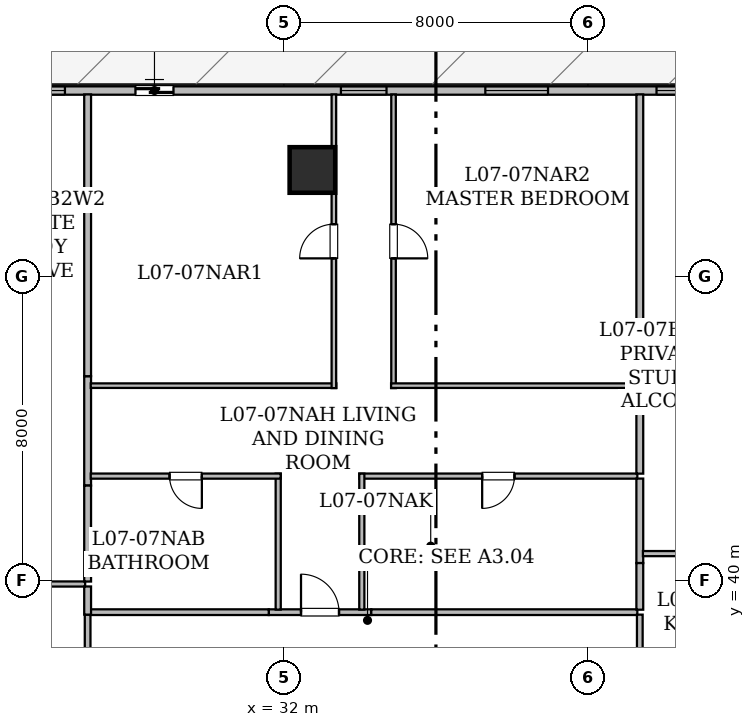
"""IFC4 building model, lengths in metres.
Left out: names, types, materials, properties, quantities, classifications, styles, units other than length and angle.
Written with IfcOpenShell. Run it as: python <this file> out.ifc"""

import sys

from ifc_helpers import new_model, si_unit, direction, frame, frame_2d, origin, origin_2d, place, context, subcontext, project, spatial, rectangle, hollow_rectangle, extrude, element, fill, save


model = new_model("IFC4")
c1 = context("Model", 3, precision=1e-05, world=origin(), true_north=direction((0.0, 1.0)))
c2 = subcontext(c1, "Body", "Model", "MODEL_VIEW")
j1 = project(units=[si_unit("LENGTHUNIT", "METRE"), si_unit("PLANEANGLEUNIT", "RADIAN")], contexts=[c1])
p1 = place(None, origin())
s1 = spatial("IfcSite", under=j1, at=p1, CompositionType="ELEMENT")
p2 = place(p1, origin())
s2 = spatial("IfcBuilding", under=s1, at=p2, CompositionType="ELEMENT")
p3 = place(p2, frame((0.0, 0.0, 33.3)))
s3 = spatial("IfcBuildingStorey", under=s2, at=p3, CompositionType="ELEMENT", Elevation=33.3)
p4 = place(p3, frame((32.75, 50.8, 0.025), z_axis=(0.0, 0.0, 1.0), x_axis=(1.0, 0.0, 0.0)))
e1 = element("IfcColumn", 1, at=p4, inside=s3, PredefinedType="COLUMN", context=c2, shape_type="SweptSolid", body=[
    extrude(hollow_rectangle(XDim=1.2, YDim=1.2, WallThickness=0.06, at=origin_2d()), origin(), (0.0, 0.0, 1.0), 3.625),
])
p5 = place(p3, frame((8.315, 52.89, 0.0), z_axis=(0.0, 0.0, 1.0), x_axis=(1.0, 0.0, 0.0)))
e2 = element("IfcWall", 2, at=p5, inside=s3, PredefinedType="STANDARD", context=c2, shape_type="SweptSolid", body=[
    extrude(rectangle(XDim=37.439, YDim=0.22, at=frame_2d((18.719, 0.0))), origin(), (0.0, 0.0, 1.0), 3.43),
])
p6 = place(p5, frame((19.779, 0.0, 0.0)))
e3 = element("IfcOpeningElement", 3, at=p6, cuts=e2, PredefinedType="OPENING", context=c2, shape_type="SweptSolid", body=[
    extrude(rectangle(XDim=1.0, YDim=2.15, at=frame_2d((0.5, 1.075))), frame((0.0, 0.12, 0.0), z_axis=(0.0, -1.0, 0.0), x_axis=(1.0, 0.0, 0.0)), (0.0, 0.0, 1.0), 0.24),
])
p7 = place(p5, frame((4.524, 0.0, 0.85)))
e4 = element("IfcOpeningElement", 4, at=p7, cuts=e2, PredefinedType="OPENING", context=c2, shape_type="SweptSolid", body=[
    extrude(rectangle(XDim=1.65, YDim=1.55, at=frame_2d((0.825, 0.775))), frame((0.0, 0.12, 0.0), z_axis=(0.0, -1.0, 0.0), x_axis=(1.0, 0.0, 0.0)), (0.0, 0.0, 1.0), 0.24),
])
p8 = place(p5, frame((16.273, 0.0, 0.85)))
e5 = element("IfcOpeningElement", 5, at=p8, cuts=e2, PredefinedType="OPENING", context=c2, shape_type="SweptSolid", body=[
    extrude(rectangle(XDim=1.65, YDim=1.55, at=frame_2d((0.825, 0.775))), frame((0.0, 0.12, 0.0), z_axis=(0.0, -1.0, 0.0), x_axis=(1.0, 0.0, 0.0)), (0.0, 0.0, 1.0), 0.24),
])
p9 = place(p5, frame((14.285, 0.0, 0.8)))
e6 = element("IfcOpeningElement", 6, at=p9, cuts=e2, PredefinedType="OPENING", context=c2, shape_type="SweptSolid", body=[
    extrude(rectangle(XDim=1.2, YDim=1.5, at=frame_2d((0.6, 0.75))), frame((0.0, 0.12, 0.0), z_axis=(0.0, -1.0, 0.0), x_axis=(1.0, 0.0, 0.0)), (0.0, 0.0, 1.0), 0.24),
])
p10 = place(p5, frame((10.238, 0.0, 0.85)))
e7 = element("IfcOpeningElement", 7, at=p10, cuts=e2, PredefinedType="OPENING", context=c2, shape_type="SweptSolid", body=[
    extrude(rectangle(XDim=1.65, YDim=1.55, at=frame_2d((0.825, 0.775))), frame((0.0, 0.12, 0.0), z_axis=(0.0, -1.0, 0.0), x_axis=(1.0, 0.0, 0.0)), (0.0, 0.0, 1.0), 0.24),
])
p11 = place(p5, frame((25.185, 0.0, 0.8)))
e8 = element("IfcOpeningElement", 8, at=p11, cuts=e2, PredefinedType="OPENING", context=c2, shape_type="SweptSolid", body=[
    extrude(rectangle(XDim=1.2, YDim=1.5, at=frame_2d((0.6, 0.75))), frame((0.0, 0.12, 0.0), z_axis=(0.0, -1.0, 0.0), x_axis=(1.0, 0.0, 0.0)), (0.0, 0.0, 1.0), 0.24),
])
p12 = place(p5, frame((28.985, 0.0, 0.85)))
e9 = element("IfcOpeningElement", 9, at=p12, cuts=e2, PredefinedType="OPENING", context=c2, shape_type="SweptSolid", body=[
    extrude(rectangle(XDim=1.65, YDim=1.55, at=frame_2d((0.825, 0.775))), frame((0.0, 0.12, 0.0), z_axis=(0.0, -1.0, 0.0), x_axis=(1.0, 0.0, 0.0)), (0.0, 0.0, 1.0), 0.24),
])
p13 = place(p5, frame((33.49, 0.0, 0.85)))
e10 = element("IfcOpeningElement", 10, at=p13, cuts=e2, PredefinedType="OPENING", context=c2, shape_type="SweptSolid", body=[
    extrude(rectangle(XDim=1.65, YDim=1.55, at=frame_2d((0.825, 0.775))), frame((0.0, 0.12, 0.0), z_axis=(0.0, -1.0, 0.0), x_axis=(1.0, 0.0, 0.0)), (0.0, 0.0, 1.0), 0.24),
])
p14 = place(p5, frame((35.942, 0.0, 0.85)))
e11 = element("IfcOpeningElement", 11, at=p14, cuts=e2, PredefinedType="OPENING", context=c2, shape_type="SweptSolid", body=[
    extrude(rectangle(XDim=1.35, YDim=1.5, at=frame_2d((0.675, 0.75))), frame((0.0, 0.12, 0.0), z_axis=(0.0, -1.0, 0.0), x_axis=(1.0, 0.0, 0.0)), (0.0, 0.0, 1.0), 0.24),
])
p15 = place(p3, frame((26.835, 35.19, 0.0), z_axis=(0.0, 0.0, 1.0), x_axis=(0.0, 1.0, 0.0)))
e12 = element("IfcWall", 12, at=p15, inside=s3, PredefinedType="STANDARD", context=c2, shape_type="SweptSolid", body=[
    extrude(rectangle(XDim=3.91, YDim=0.15, at=frame_2d((1.955, 0.0))), origin(), (0.0, 0.0, 1.0), 2.647),
])
p16 = place(p3, frame((31.601, 39.165, 0.0), z_axis=(0.0, 0.0, 1.0), x_axis=(1.0, 0.0, 0.0)))
e13 = element("IfcWall", 13, at=p16, inside=s3, PredefinedType="STANDARD", context=c2, shape_type="SweptSolid", body=[
    extrude(rectangle(XDim=2.698, YDim=0.15, at=frame_2d((1.349, 0.0))), origin(), (0.0, 0.0, 1.0), 3.43),
])
p17 = place(p16, frame((0.849, 0.0, 0.0)))
e14 = element("IfcOpeningElement", 14, at=p17, cuts=e13, PredefinedType="OPENING", context=c2, shape_type="SweptSolid", body=[
    extrude(rectangle(XDim=1.0, YDim=2.15, at=frame_2d((0.5, 1.075))), frame((0.0, 0.085, 0.0), z_axis=(0.0, -1.0, 0.0), x_axis=(1.0, 0.0, 0.0)), (0.0, 0.0, 1.0), 0.17),
])
p18 = place(p3, frame((26.9, 39.165, 0.0), z_axis=(0.0, 0.0, 1.0), x_axis=(1.0, 0.0, 0.0)))
e15 = element("IfcWall", 15, at=p18, inside=s3, PredefinedType="STANDARD", context=c2, shape_type="SweptSolid", body=[
    extrude(rectangle(XDim=4.701, YDim=0.15, at=frame_2d((2.351, 0.0))), origin(), (0.0, 0.0, 1.0), 2.647),
])
p19 = place(p3, frame((34.299, 39.165, 0.0), z_axis=(0.0, 0.0, 1.0), x_axis=(1.0, 0.0, 0.0)))
e16 = element("IfcWall", 16, at=p19, inside=s3, PredefinedType="STANDARD", context=c2, shape_type="SweptSolid", body=[
    extrude(rectangle(XDim=7.001, YDim=0.15, at=frame_2d((3.5, 0.0))), origin(), (0.0, 0.0, 1.0), 3.43),
])
p20 = place(p3, frame((41.365, 39.1, 0.0), z_axis=(0.0, 0.0, 1.0), x_axis=(0.0, -1.0, 0.0)))
e17 = element("IfcWall", 17, at=p20, inside=s3, PredefinedType="STANDARD", context=c2, shape_type="SweptSolid", body=[
    extrude(rectangle(XDim=3.11, YDim=0.15, at=frame_2d((1.555, 0.0))), origin(), (0.0, 0.0, 1.0), 2.647),
])
p21 = place(p3, frame((26.77, 39.906, 0.0), z_axis=(0.0, 0.0, 1.0), x_axis=(-1.0, 0.0, 0.0)))
e18 = element("IfcWall", 18, at=p21, inside=s3, PredefinedType="PARTITIONING", context=c2, shape_type="SweptSolid", body=[
    extrude(rectangle(XDim=2.715, YDim=0.135, at=frame_2d((1.357, 0.0))), origin(), (0.0, 0.0, 1.0), 3.43),
])
p22 = place(p3, frame((26.835, 45.374, 0.0), z_axis=(0.0, 0.0, 1.0), x_axis=(0.0, -1.0, 0.0)))
e19 = element("IfcWall", 19, at=p22, inside=s3, PredefinedType="STANDARD", context=c2, shape_type="SweptSolid", body=[
    extrude(rectangle(XDim=2.878, YDim=0.18, at=frame_2d((1.439, 0.0))), origin(), (0.0, 0.0, 1.0), 2.957),
])
p23 = place(p3, frame((26.835, 42.496, 0.0), z_axis=(0.0, 0.0, 1.0), x_axis=(0.0, -1.0, 0.0)))
e20 = element("IfcWall", 20, at=p23, inside=s3, PredefinedType="STANDARD", context=c2, shape_type="SweptSolid", body=[
    extrude(rectangle(XDim=2.525, YDim=0.18, at=frame_2d((1.263, 0.0))), origin(), (0.0, 0.0, 1.0), 2.957),
])
p24 = place(p3, frame((26.835, 52.788, 0.0), z_axis=(0.0, 0.0, 1.0), x_axis=(0.0, -1.0, 0.0)))
e21 = element("IfcWall", 21, at=p24, inside=s3, PredefinedType="STANDARD", context=c2, shape_type="SweptSolid", body=[
    extrude(rectangle(XDim=7.414, YDim=0.18, at=frame_2d((3.707, 0.0))), origin(), (0.0, 0.0, 1.0), 2.803),
])
p25 = place(p3, frame((26.835, 39.841, 0.0), z_axis=(0.0, 0.0, 1.0), x_axis=(0.0, -1.0, 0.0)))
e22 = element("IfcWall", 22, at=p25, inside=s3, PredefinedType="STANDARD", context=c2, shape_type="SweptSolid", body=[
    extrude(rectangle(XDim=0.741, YDim=0.18, at=frame_2d((0.371, 0.0))), origin(), (0.0, 0.0, 1.0), 3.43),
])
p26 = place(p3, frame((31.85, 39.232, 0.0), z_axis=(0.0, 0.0, 1.0), x_axis=(0.0, 1.0, 0.0)))
e23 = element("IfcWall", 23, at=p26, inside=s3, PredefinedType="PARTITIONING", context=c2, shape_type="SweptSolid", body=[
    extrude(rectangle(XDim=3.578, YDim=0.135, at=frame_2d((1.789, 0.0))), origin(), (0.0, 0.0, 1.0), 2.957),
])
p27 = place(p3, frame((31.915, 42.745, 0.0), z_axis=(0.0, 0.0, 1.0), x_axis=(-1.0, 0.0, 0.0)))
e24 = element("IfcWall", 24, at=p27, inside=s3, PredefinedType="PARTITIONING", context=c2, shape_type="SweptSolid", body=[
    extrude(rectangle(XDim=4.998, YDim=0.135, at=frame_2d((2.499, 0.0))), origin(), (0.0, 0.0, 1.0), 2.647),
])
p28 = place(p27, frame((2.074, 0.0, 0.0)))
e25 = element("IfcOpeningElement", 25, at=p28, cuts=e24, PredefinedType="OPENING", context=c2, shape_type="SweptSolid", body=[
    extrude(rectangle(XDim=0.85, YDim=2.1, at=frame_2d((0.425, 1.05))), frame((0.0, 0.077, 0.0), z_axis=(0.0, -1.0, 0.0), x_axis=(1.0, 0.0, 0.0)), (0.0, 0.0, 1.0), 0.155),
])
p29 = place(p3, frame((41.3, 42.745, 0.0), z_axis=(0.0, 0.0, 1.0), x_axis=(-1.0, 0.0, 0.0)))
e26 = element("IfcWall", 26, at=p29, inside=s3, PredefinedType="PARTITIONING", context=c2, shape_type="SweptSolid", body=[
    extrude(rectangle(XDim=7.315, YDim=0.135, at=frame_2d((3.657, 0.0))), origin(), (0.0, 0.0, 1.0), 2.957),
])
p30 = place(p29, frame((3.233, 0.0, 0.0)))
e27 = element("IfcOpeningElement", 27, at=p30, cuts=e26, PredefinedType="OPENING", context=c2, shape_type="SweptSolid", body=[
    extrude(rectangle(XDim=0.85, YDim=2.1, at=frame_2d((0.425, 1.05))), frame((0.0, 0.077, 0.0), z_axis=(0.0, -1.0, 0.0), x_axis=(1.0, 0.0, 0.0)), (0.0, 0.0, 1.0), 0.155),
])
p31 = place(p3, frame((34.05, 42.81, 0.0), z_axis=(0.0, 0.0, 1.0), x_axis=(0.0, -1.0, 0.0)))
e28 = element("IfcWall", 28, at=p31, inside=s3, PredefinedType="PARTITIONING", context=c2, shape_type="SweptSolid", body=[
    extrude(rectangle(XDim=3.578, YDim=0.135, at=frame_2d((1.789, 0.0))), origin(), (0.0, 0.0, 1.0), 2.957),
])
p32 = place(p3, frame((26.917, 45.125, 0.0), z_axis=(0.0, 0.0, 1.0), x_axis=(1.0, 0.0, 0.0)))
e29 = element("IfcWall", 29, at=p32, inside=s3, PredefinedType="PARTITIONING", context=c2, shape_type="SweptSolid", body=[
    extrude(rectangle(XDim=6.463, YDim=0.12, at=frame_2d((3.231, 0.0))), origin(), (0.0, 0.0, 1.0), 2.647),
])
p33 = place(p3, frame((33.315, 45.06, 0.0), z_axis=(0.0, 0.0, 1.0), x_axis=(0.0, 1.0, 0.0)))
e30 = element("IfcWall", 30, at=p33, inside=s3, PredefinedType="PARTITIONING", context=c2, shape_type="SweptSolid", body=[
    extrude(rectangle(XDim=7.728, YDim=0.12, at=frame_2d((3.864, 0.0))), origin(), (0.0, 0.0, 1.0), 2.803),
])
p34 = place(p33, frame((3.414, 0.0, 0.0)))
e31 = element("IfcOpeningElement", 31, at=p34, cuts=e30, PredefinedType="OPENING", context=c2, shape_type="SweptSolid", body=[
    extrude(rectangle(XDim=0.9, YDim=2.1, at=frame_2d((0.45, 1.05))), frame((0.0, 0.07, 0.0), z_axis=(0.0, -1.0, 0.0), x_axis=(1.0, 0.0, 0.0)), (0.0, 0.0, 1.0), 0.14),
])
p35 = place(p3, frame((34.885, 52.788, 0.0), z_axis=(0.0, 0.0, 1.0), x_axis=(0.0, -1.0, 0.0)))
e32 = element("IfcWall", 32, at=p35, inside=s3, PredefinedType="PARTITIONING", context=c2, shape_type="SweptSolid", body=[
    extrude(rectangle(XDim=7.728, YDim=0.12, at=frame_2d((3.864, 0.0))), origin(), (0.0, 0.0, 1.0), 2.803),
])
p36 = place(p35, frame((3.414, 0.0, 0.0)))
e33 = element("IfcOpeningElement", 33, at=p36, cuts=e32, PredefinedType="OPENING", context=c2, shape_type="SweptSolid", body=[
    extrude(rectangle(XDim=0.9, YDim=2.1, at=frame_2d((0.45, 1.05))), frame((0.0, 0.07, 0.0), z_axis=(0.0, -1.0, 0.0), x_axis=(1.0, 0.0, 0.0)), (0.0, 0.0, 1.0), 0.14),
])
p37 = place(p3, frame((34.82, 45.125, 0.0), z_axis=(0.0, 0.0, 1.0), x_axis=(1.0, 0.0, 0.0)))
e34 = element("IfcWall", 34, at=p37, inside=s3, PredefinedType="PARTITIONING", context=c2, shape_type="SweptSolid", body=[
    extrude(rectangle(XDim=6.48, YDim=0.12, at=frame_2d((3.24, 0.0))), origin(), (0.0, 0.0, 1.0), 3.43),
])
p38 = place(p3, frame((41.365, 45.06, 0.0), z_axis=(0.0, 0.0, 1.0), x_axis=(0.0, -1.0, 0.0)))
e35 = element("IfcWall", 35, at=p38, inside=s3, PredefinedType="STANDARD", context=c2, shape_type="SweptSolid", body=[
    extrude(rectangle(XDim=2.25, YDim=0.18, at=frame_2d((1.125, 0.0))), origin(), (0.0, 0.0, 1.0), 3.43),
])
p39 = place(p3, frame((41.365, 42.68, 0.0), z_axis=(0.0, 0.0, 1.0), x_axis=(0.0, -1.0, 0.0)))
e36 = element("IfcWall", 36, at=p39, inside=s3, PredefinedType="STANDARD", context=c2, shape_type="SweptSolid", body=[
    extrude(rectangle(XDim=2.223, YDim=0.18, at=frame_2d((1.111, 0.0))), origin(), (0.0, 0.0, 1.0), 2.957),
])
p40 = place(p3, frame((41.365, 40.457, 0.0), z_axis=(0.0, 0.0, 1.0), x_axis=(0.0, -1.0, 0.0)))
e37 = element("IfcWall", 37, at=p40, inside=s3, PredefinedType="STANDARD", context=c2, shape_type="SweptSolid", body=[
    extrude(rectangle(XDim=1.227, YDim=0.18, at=frame_2d((0.614, 0.0))), origin(), (0.0, 0.0, 1.0), 3.43),
])
p41 = place(p3, frame((41.365, 52.788, 0.0), z_axis=(0.0, 0.0, 1.0), x_axis=(0.0, -1.0, 0.0)))
e38 = element("IfcWall", 38, at=p41, inside=s3, PredefinedType="STANDARD", context=c2, shape_type="SweptSolid", body=[
    extrude(rectangle(XDim=7.598, YDim=0.18, at=frame_2d((3.799, 0.0))), origin(), (0.0, 0.0, 1.0), 2.803),
])
p42 = place(p3, frame((43.83, 40.706, 0.0), z_axis=(0.0, 0.0, 1.0), x_axis=(-1.0, 0.0, 0.0)))
e39 = element("IfcWall", 39, at=p42, inside=s3, PredefinedType="PARTITIONING", context=c2, shape_type="SweptSolid", body=[
    extrude(rectangle(XDim=2.383, YDim=0.135, at=frame_2d((1.191, 0.0))), origin(), (0.0, 0.0, 1.0), 2.647),
])
p43 = place(p6, origin())
e40 = element("IfcDoor", 40, at=p43, inside=s3, OperationType="SLIDING_TO_LEFT", PredefinedType="DOOR", context=c2, shape_type="SweptSolid", body=[
    extrude(rectangle(XDim=1.0, YDim=2.15, at=frame_2d((0.5, 1.075))), frame((0.0, 0.025, 0.0), z_axis=(0.0, -1.0, 0.0), x_axis=(1.0, 0.0, 0.0)), (0.0, 0.0, 1.0), 0.05),
])
fill(e3, e40)
p44 = place(p8, origin())
e41 = element("IfcWindow", 41, at=p44, inside=s3, PartitioningType="SINGLE_PANEL", PredefinedType="WINDOW", context=c2, shape_type="SweptSolid", body=[
    extrude(rectangle(XDim=1.65, YDim=1.55, at=frame_2d((0.825, 0.775))), frame((0.0, 0.03, 0.0), z_axis=(0.0, -1.0, 0.0), x_axis=(1.0, 0.0, 0.0)), (0.0, 0.0, 1.0), 0.06),
])
fill(e5, e41)
p45 = place(p11, origin())
e42 = element("IfcWindow", 42, at=p45, inside=s3, PartitioningType="SINGLE_PANEL", PredefinedType="WINDOW", context=c2, shape_type="SweptSolid", body=[
    extrude(rectangle(XDim=1.2, YDim=1.5, at=frame_2d((0.6, 0.75))), frame((0.0, 0.03, 0.0), z_axis=(0.0, -1.0, 0.0), x_axis=(1.0, 0.0, 0.0)), (0.0, 0.0, 1.0), 0.06),
])
fill(e8, e42)
p46 = place(p12, origin())
e43 = element("IfcWindow", 43, at=p46, inside=s3, PartitioningType="SINGLE_PANEL", PredefinedType="WINDOW", context=c2, shape_type="SweptSolid", body=[
    extrude(rectangle(XDim=1.65, YDim=1.55, at=frame_2d((0.825, 0.775))), frame((0.0, 0.03, 0.0), z_axis=(0.0, -1.0, 0.0), x_axis=(1.0, 0.0, 0.0)), (0.0, 0.0, 1.0), 0.06),
])
fill(e9, e43)
p47 = place(p13, origin())
e44 = element("IfcWindow", 44, at=p47, inside=s3, PartitioningType="SINGLE_PANEL", PredefinedType="WINDOW", context=c2, shape_type="SweptSolid", body=[
    extrude(rectangle(XDim=1.65, YDim=1.55, at=frame_2d((0.825, 0.775))), frame((0.0, 0.03, 0.0), z_axis=(0.0, -1.0, 0.0), x_axis=(1.0, 0.0, 0.0)), (0.0, 0.0, 1.0), 0.06),
])
fill(e10, e44)
p48 = place(p17, origin())
e45 = element("IfcDoor", 45, at=p48, inside=s3, OperationType="SINGLE_SWING_LEFT", PredefinedType="DOOR", context=c2, shape_type="SweptSolid", body=[
    extrude(rectangle(XDim=1.0, YDim=2.15, at=frame_2d((0.5, 1.075))), frame((0.0, 0.025, 0.0), z_axis=(0.0, -1.0, 0.0), x_axis=(1.0, 0.0, 0.0)), (0.0, 0.0, 1.0), 0.05),
])
fill(e14, e45)
p49 = place(p28, origin())
e46 = element("IfcDoor", 46, at=p49, inside=s3, OperationType="SINGLE_SWING_LEFT", PredefinedType="DOOR", context=c2, shape_type="SweptSolid", body=[
    extrude(rectangle(XDim=0.85, YDim=2.1, at=frame_2d((0.425, 1.05))), frame((0.0, 0.025, 0.0), z_axis=(0.0, -1.0, 0.0), x_axis=(1.0, 0.0, 0.0)), (0.0, 0.0, 1.0), 0.05),
])
fill(e25, e46)
p50 = place(p30, origin())
e47 = element("IfcDoor", 47, at=p50, inside=s3, OperationType="SINGLE_SWING_RIGHT", PredefinedType="DOOR", context=c2, shape_type="SweptSolid", body=[
    extrude(rectangle(XDim=0.85, YDim=2.1, at=frame_2d((0.425, 1.05))), frame((0.0, 0.025, 0.0), z_axis=(0.0, -1.0, 0.0), x_axis=(1.0, 0.0, 0.0)), (0.0, 0.0, 1.0), 0.05),
])
fill(e27, e47)
p51 = place(p34, origin())
e48 = element("IfcDoor", 48, at=p51, inside=s3, OperationType="SINGLE_SWING_LEFT", PredefinedType="DOOR", context=c2, shape_type="SweptSolid", body=[
    extrude(rectangle(XDim=0.9, YDim=2.1, at=frame_2d((0.45, 1.05))), frame((0.0, 0.025, 0.0), z_axis=(0.0, -1.0, 0.0), x_axis=(1.0, 0.0, 0.0)), (0.0, 0.0, 1.0), 0.05),
])
fill(e31, e48)
p52 = place(p36, origin())
e49 = element("IfcDoor", 49, at=p52, inside=s3, OperationType="SINGLE_SWING_RIGHT", PredefinedType="DOOR", context=c2, shape_type="SweptSolid", body=[
    extrude(rectangle(XDim=0.9, YDim=2.1, at=frame_2d((0.45, 1.05))), frame((0.0, 0.025, 0.0), z_axis=(0.0, -1.0, 0.0), x_axis=(1.0, 0.0, 0.0)), (0.0, 0.0, 1.0), 0.05),
])
fill(e33, e49)
save(model, sys.argv[1])
